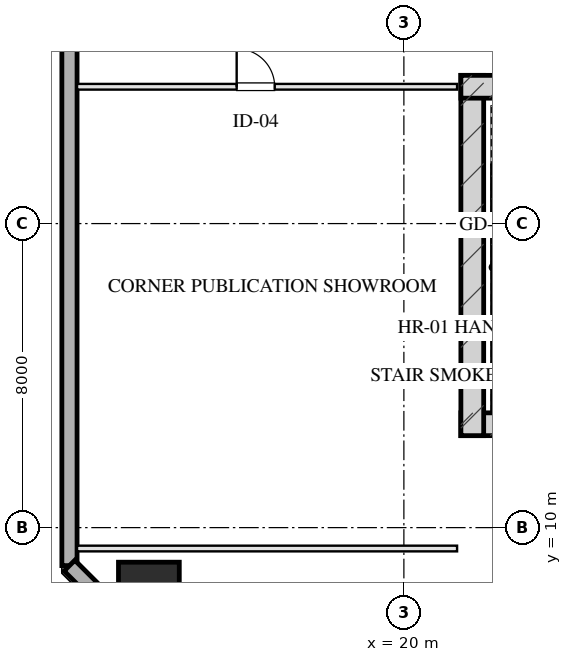
"""IFC4 building model, lengths in metres.
Left out: names, types, materials, properties, quantities, classifications, styles, units other than length and angle.
Written with IfcOpenShell. Run it as: python <this file> out.ifc"""

import sys

from ifc_helpers import new_model, si_unit, direction, frame, frame_2d, origin, origin_2d, place, context, subcontext, project, spatial, rectangle, hollow_rectangle, extrude, element, fill, save


model = new_model("IFC4")
c1 = context("Model", 3, precision=1e-05, world=origin(), true_north=direction((0.0, 1.0)))
c2 = subcontext(c1, "Body", "Model", "MODEL_VIEW")
j1 = project(units=[si_unit("LENGTHUNIT", "METRE"), si_unit("PLANEANGLEUNIT", "RADIAN")], contexts=[c1])
p1 = place(None, origin())
s1 = spatial("IfcSite", under=j1, at=p1, CompositionType="ELEMENT")
p2 = place(p1, origin())
s2 = spatial("IfcBuilding", under=s1, at=p2, CompositionType="ELEMENT")
p3 = place(p2, frame((0.0, 0.0, 120.75)))
s3 = spatial("IfcBuildingStorey", under=s2, at=p3, CompositionType="ELEMENT", Elevation=120.75)
p4 = place(p3, frame((21.5, 12.72, 0.0), z_axis=(0.0, 0.0, 1.0), x_axis=(1.0, 0.0, 0.0)))
e1 = element("IfcWall", 1, at=p4, inside=s3, PredefinedType="SHEAR", context=c2, shape_type="SweptSolid", body=[
    extrude(rectangle(XDim=17.0, YDim=0.6, at=frame_2d((8.5, 0.0))), origin(), (0.0, 0.0, 1.0), 3.45),
])
p5 = place(p3, frame((21.8, 21.9, 0.0), z_axis=(0.0, 0.0, 1.0), x_axis=(0.0, -1.0, 0.0)))
e2 = element("IfcWall", 2, at=p5, inside=s3, PredefinedType="SHEAR", context=c2, shape_type="SweptSolid", body=[
    extrude(rectangle(XDim=9.48, YDim=0.6, at=frame_2d((4.74, 0.0))), origin(), (0.0, 0.0, 1.0), 3.45),
])
p6 = place(p3, frame((21.5, 21.6, 0.0), z_axis=(0.0, 0.0, 1.0), x_axis=(1.0, 0.0, 0.0)))
e3 = element("IfcWall", 3, at=p6, inside=s3, PredefinedType="SHEAR", context=c2, shape_type="SweptSolid", body=[
    extrude(rectangle(XDim=4.22, YDim=0.6, at=frame_2d((2.11, 0.0))), origin(), (0.0, 0.0, 1.0), 3.45),
])
p7 = place(p3, frame((13.29, 8.29, 0.0), z_axis=(0.0, 0.0, 1.0), x_axis=(1.0, 0.0, 0.0)))
e4 = element("IfcColumn", 4, at=p7, inside=s3, PredefinedType="COLUMN", context=c2, shape_type="SweptSolid", body=[
    extrude(hollow_rectangle(XDim=1.6, YDim=1.6, WallThickness=0.055, at=origin_2d()), origin(), (0.0, 0.0, 1.0), 3.451),
])
p8 = place(p3, frame((11.2, 9.0, 0.0), z_axis=(0.0, 0.0, 1.0), x_axis=(0.0, 1.0, 0.0)))
e5 = element("IfcWall", 5, at=p8, inside=s3, PredefinedType="SOLIDWALL", context=c2, shape_type="SweptSolid", body=[
    extrude(rectangle(XDim=50.0, YDim=0.4, at=frame_2d((25.0, 0.0))), origin(), (0.0, 0.0, 1.0), 2.61),
])
p9 = place(p8, frame((17.4, 0.0, 0.75)))
e6 = element("IfcOpeningElement", 6, at=p9, cuts=e5, PredefinedType="OPENING", context=c2, shape_type="SweptSolid", body=[
    extrude(rectangle(XDim=2.4, YDim=1.46, at=frame_2d((1.2, 0.73))), frame((0.0, 0.21, 0.0), z_axis=(0.0, -1.0, 0.0), x_axis=(1.0, 0.0, 0.0)), (0.0, 0.0, 1.0), 0.42),
])
p10 = place(p8, frame((30.25, 0.0, 0.0)))
e7 = element("IfcOpeningElement", 7, at=p10, cuts=e5, PredefinedType="OPENING", context=c2, shape_type="SweptSolid", body=[
    extrude(rectangle(XDim=1.1, YDim=2.15, at=frame_2d((0.55, 1.075))), frame((0.0, 0.21, 0.0), z_axis=(0.0, -1.0, 0.0), x_axis=(1.0, 0.0, 0.0)), (0.0, 0.0, 1.0), 0.42),
])
p11 = place(p3, frame((14.0, 6.2, 0.0), z_axis=(0.0, 0.0, 1.0), x_axis=(-0.707106781187, 0.707106781187, 0.0)))
e8 = element("IfcWall", 8, at=p11, inside=s3, PredefinedType="SOLIDWALL", context=c2, shape_type="SweptSolid", body=[
    extrude(rectangle(XDim=3.96, YDim=0.4, at=frame_2d((1.98, 0.0))), origin(), (0.0, 0.0, 1.0), 2.61),
])
p12 = place(p3, frame((11.4, 9.45, 0.0), z_axis=(0.0, 0.0, 1.0), x_axis=(1.0, 0.0, 0.0)))
e9 = element("IfcWall", 9, at=p12, inside=s3, PredefinedType="PARTITIONING", context=c2, shape_type="SweptSolid", body=[
    extrude(rectangle(XDim=10.0, YDim=0.15, at=frame_2d((5.0, 0.0))), origin(), (0.0, 0.0, 1.0), 3.175),
])
p13 = place(p3, frame((11.4, 21.6, 0.0), z_axis=(0.0, 0.0, 1.0), x_axis=(1.0, 0.0, 0.0)))
e10 = element("IfcWall", 10, at=p13, inside=s3, PredefinedType="PARTITIONING", context=c2, shape_type="SweptSolid", body=[
    extrude(rectangle(XDim=10.0, YDim=0.15, at=frame_2d((5.0, 0.0))), origin(), (0.0, 0.0, 1.0), 3.175),
])
p14 = place(p13, frame((4.2, 0.0, 0.0)))
e11 = element("IfcOpeningElement", 11, at=p14, cuts=e10, PredefinedType="OPENING", context=c2, shape_type="SweptSolid", body=[
    extrude(rectangle(XDim=1.0, YDim=2.05, at=frame_2d((0.5, 1.025))), frame((0.0, 0.085, 0.0), z_axis=(0.0, -1.0, 0.0), x_axis=(1.0, 0.0, 0.0)), (0.0, 0.0, 1.0), 0.17),
])
p15 = place(p14, origin())
e12 = element("IfcDoor", 12, at=p15, inside=s3, OperationType="SINGLE_SWING_LEFT", PredefinedType="DOOR", context=c2, shape_type="SweptSolid", body=[
    extrude(rectangle(XDim=1.0, YDim=2.05, at=frame_2d((0.5, 1.025))), frame((0.0, 0.025, 0.0), z_axis=(0.0, -1.0, 0.0), x_axis=(1.0, 0.0, 0.0)), (0.0, 0.0, 1.0), 0.05),
])
fill(e11, e12)
save(model, sys.argv[1])
